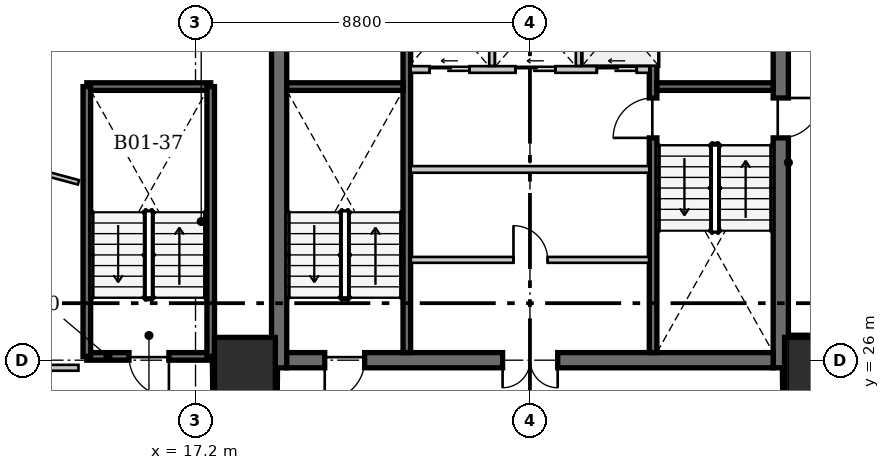
"""IFC4 building model, lengths in metres.
Left out: names, types, materials, properties, quantities, classifications, styles, units other than length and angle.
Written with IfcOpenShell. Run it as: python <this file> out.ifc"""

import sys

from ifc_helpers import new_model, si_unit, direction, frame, frame_2d, origin, origin_2d, place, context, subcontext, project, spatial, rectangle, extrude, source, transform, mapped, element, fill, save


model = new_model("IFC4")
c1 = context("Model", 3, precision=1e-05, world=origin(), true_north=direction((0.0, 1.0)))
c2 = subcontext(c1, "Body", "Model", "MODEL_VIEW")
j1 = project(units=[si_unit("LENGTHUNIT", "METRE"), si_unit("PLANEANGLEUNIT", "RADIAN")], contexts=[c1])
p1 = place(None, origin())
s1 = spatial("IfcSite", under=j1, at=p1, CompositionType="ELEMENT")
p2 = place(p1, origin())
s2 = spatial("IfcBuilding", under=s1, at=p2, CompositionType="ELEMENT")
p3 = place(p2, frame((0.0, 0.0, -5.8)))
s3 = spatial("IfcBuildingStorey", under=s2, at=p3, CompositionType="ELEMENT", Elevation=-5.8)
for number, where, z_axis, x_axis in (
    (1, (18.5, 25.8, 0.0), (0.0, 0.0, 1.0), (1.0, 0.0, 0.0)),
    (2, (33.5, 25.8, 0.0), (0.0, 0.0, 1.0), (1.0, 0.0, 0.0)),
):
    element("IfcColumn", number, at=place(p3, frame(where, z_axis=z_axis, x_axis=x_axis)), inside=s3, PredefinedType="COLUMN", context=c2, shape_type="SweptSolid", body=[
        extrude(rectangle(XDim=1.6, YDim=1.6, at=origin_2d()), origin(), (0.0, 0.0, 1.0), 5.45),
    ])
p4 = place(p3, frame((19.4, 25.8, 0.0), z_axis=(0.0, 0.0, 1.0), x_axis=(0.0, 1.0, 0.0)))
e3 = element("IfcWall", 3, at=p4, inside=s3, PredefinedType="SHEAR", context=c2, shape_type="SweptSolid", body=[
    extrude(rectangle(XDim=10.8, YDim=0.4, at=frame_2d((5.4, 0.0))), origin(), (0.0, 0.0, 1.0), 5.8),
])
p5 = place(p3, frame((32.6, 36.6, 0.0), z_axis=(0.0, 0.0, 1.0), x_axis=(0.0, -1.0, 0.0)))
e4 = element("IfcWall", 4, at=p5, inside=s3, PredefinedType="SHEAR", context=c2, shape_type="SweptSolid", body=[
    extrude(rectangle(XDim=10.8, YDim=0.4, at=frame_2d((5.4, 0.0))), origin(), (0.0, 0.0, 1.0), 5.8),
])
p6 = place(p5, frame((3.7, 0.0, 0.0)))
e5 = element("IfcOpeningElement", 5, at=p6, cuts=e4, PredefinedType="OPENING", context=c2, shape_type="SweptSolid", body=[
    extrude(rectangle(XDim=1.05, YDim=2.15, at=frame_2d((0.525, 1.075))), frame((0.0, 0.21, 0.0), z_axis=(0.0, -1.0, 0.0), x_axis=(1.0, 0.0, 0.0)), (0.0, 0.0, 1.0), 0.42),
])
p7 = place(p3, frame((32.4, 26.0, 0.0), z_axis=(0.0, 0.0, 1.0), x_axis=(-1.0, 0.0, 0.0)))
e6 = element("IfcWall", 6, at=p7, inside=s3, PredefinedType="SHEAR", context=c2, shape_type="SweptSolid", body=[
    extrude(rectangle(XDim=12.8, YDim=0.4, at=frame_2d((6.4, 0.0))), origin(), (0.0, 0.0, 1.0), 5.8),
])
p8 = place(p7, frame((10.75, 0.0, 0.0)))
e7 = element("IfcOpeningElement", 7, at=p8, cuts=e6, PredefinedType="OPENING", context=c2, shape_type="SweptSolid", body=[
    extrude(rectangle(XDim=1.05, YDim=2.15, at=frame_2d((0.525, 1.075))), frame((0.0, 0.21, 0.0), z_axis=(0.0, -1.0, 0.0), x_axis=(1.0, 0.0, 0.0)), (0.0, 0.0, 1.0), 0.42),
])
p9 = place(p7, frame((5.67, 0.0, 0.0)))
e8 = element("IfcOpeningElement", 8, at=p9, cuts=e6, PredefinedType="OPENING", context=c2, shape_type="SweptSolid", body=[
    extrude(rectangle(XDim=1.45, YDim=2.2, at=frame_2d((0.725, 1.1))), frame((0.0, 0.21, 0.0), z_axis=(0.0, -1.0, 0.0), x_axis=(1.0, 0.0, 0.0)), (0.0, 0.0, 1.0), 0.42),
])
p10 = place(p3, frame((22.76, 26.2, 0.0), z_axis=(0.0, 0.0, 1.0), x_axis=(0.0, 1.0, 0.0)))
e9 = element("IfcWall", 9, at=p10, inside=s3, PredefinedType="SHEAR", context=c2, shape_type="SweptSolid", body=[
    extrude(rectangle(XDim=10.0, YDim=0.2, at=frame_2d((5.0, 0.0))), origin(), (0.0, 0.0, 1.0), 5.8),
])
p11 = place(p3, frame((29.24, 26.2, 0.0), z_axis=(0.0, 0.0, 1.0), x_axis=(0.0, 1.0, 0.0)))
e10 = element("IfcWall", 10, at=p11, inside=s3, PredefinedType="SHEAR", context=c2, shape_type="SweptSolid", body=[
    extrude(rectangle(XDim=10.0, YDim=0.2, at=frame_2d((5.0, 0.0))), origin(), (0.0, 0.0, 1.0), 5.8),
])
p12 = place(p11, frame((5.65, 0.0, 0.0)))
e11 = element("IfcOpeningElement", 11, at=p12, cuts=e10, PredefinedType="OPENING", context=c2, shape_type="SweptSolid", body=[
    extrude(rectangle(XDim=1.05, YDim=2.15, at=frame_2d((0.525, 1.075))), frame((0.0, 0.11, 0.0), z_axis=(0.0, -1.0, 0.0), x_axis=(1.0, 0.0, 0.0)), (0.0, 0.0, 1.0), 0.22),
])
for number, where, z_axis, x_axis in (
    (12, (19.6, 33.2, 0.0), (0.0, 0.0, 1.0), (1.0, 0.0, 0.0)),
    (13, (29.34, 33.2, 0.0), (0.0, 0.0, 1.0), (1.0, 0.0, 0.0)),
):
    element("IfcWall", number, at=place(p3, frame(where, z_axis=z_axis, x_axis=x_axis)), inside=s3, PredefinedType="SHEAR", context=c2, shape_type="SweptSolid", body=[
        extrude(rectangle(XDim=3.06, YDim=0.2, at=frame_2d((1.53, 0.0))), origin(), (0.0, 0.0, 1.0), 5.8),
    ])
p13 = place(p3, frame((22.86, 33.65, 0.0), z_axis=(0.0, 0.0, 1.0), x_axis=(1.0, 0.0, 0.0)))
e14 = element("IfcWall", 14, at=p13, inside=s3, PredefinedType="SOLIDWALL", context=c2, shape_type="SweptSolid", body=[
    extrude(rectangle(XDim=6.28, YDim=0.175, at=frame_2d((3.14, 0.0))), origin(), (0.0, 0.0, 1.0), 5.45),
])
p14 = place(p13, frame((0.5, 0.0, 0.0)))
e15 = element("IfcOpeningElement", 15, at=p14, cuts=e14, PredefinedType="OPENING", context=c2, shape_type="SweptSolid", body=[
    extrude(rectangle(XDim=1.05, YDim=2.15, at=frame_2d((0.525, 1.075))), frame((0.0, 0.098, 0.0), z_axis=(0.0, -1.0, 0.0), x_axis=(1.0, 0.0, 0.0)), (0.0, 0.0, 1.0), 0.195),
])
p15 = place(p13, frame((2.76, 0.0, 0.0)))
e16 = element("IfcOpeningElement", 16, at=p15, cuts=e14, PredefinedType="OPENING", context=c2, shape_type="SweptSolid", body=[
    extrude(rectangle(XDim=1.05, YDim=2.15, at=frame_2d((0.525, 1.075))), frame((0.0, 0.098, 0.0), z_axis=(0.0, -1.0, 0.0), x_axis=(1.0, 0.0, 0.0)), (0.0, 0.0, 1.0), 0.195),
])
p16 = place(p13, frame((4.9, 0.0, 0.0)))
e17 = element("IfcOpeningElement", 17, at=p16, cuts=e14, PredefinedType="OPENING", context=c2, shape_type="SweptSolid", body=[
    extrude(rectangle(XDim=1.05, YDim=2.15, at=frame_2d((0.525, 1.075))), frame((0.0, 0.098, 0.0), z_axis=(0.0, -1.0, 0.0), x_axis=(1.0, 0.0, 0.0)), (0.0, 0.0, 1.0), 0.195),
])
for number, where, z_axis, x_axis in (
    (18, (25.0, 33.743, 0.0), (0.0, 0.0, 1.0), (0.0, 1.0, 0.0)),
    (19, (27.28, 33.743, 0.0), (0.0, 0.0, 1.0), (0.0, 1.0, 0.0)),
):
    element("IfcWall", number, at=place(p3, frame(where, z_axis=z_axis, x_axis=x_axis)), inside=s3, PredefinedType="SOLIDWALL", context=c2, shape_type="SweptSolid", body=[
        extrude(rectangle(XDim=2.457, YDim=0.145, at=frame_2d((1.228, 0.0))), origin(), (0.0, 0.0, 1.0), 5.45),
    ])
p17 = place(p3, frame((22.86, 31.02, 0.0), z_axis=(0.0, 0.0, 1.0), x_axis=(1.0, 0.0, 0.0)))
e20 = element("IfcWall", 20, at=p17, inside=s3, PredefinedType="SOLIDWALL", context=c2, shape_type="SweptSolid", body=[
    extrude(rectangle(XDim=6.28, YDim=0.175, at=frame_2d((3.14, 0.0))), origin(), (0.0, 0.0, 1.0), 5.45),
])
p18 = place(p3, frame((22.866, 28.64, 0.0), z_axis=(0.0, 0.0, 1.0), x_axis=(1.0, 0.0, 0.0)))
e21 = element("IfcWall", 21, at=p18, inside=s3, PredefinedType="PARTITIONING", context=c2, shape_type="SweptSolid", body=[
    extrude(rectangle(XDim=6.268, YDim=0.155, at=frame_2d((3.134, 0.0))), origin(), (0.0, 0.0, 1.0), 5.45),
])
p19 = place(p18, frame((2.7, 0.0, 0.0)))
e22 = element("IfcOpeningElement", 22, at=p19, cuts=e21, PredefinedType="OPENING", context=c2, shape_type="SweptSolid", body=[
    extrude(rectangle(XDim=0.9, YDim=2.1, at=frame_2d((0.45, 1.05))), frame((0.0, 0.087, 0.0), z_axis=(0.0, -1.0, 0.0), x_axis=(1.0, 0.0, 0.0)), (0.0, 0.0, 1.0), 0.175),
])
p20 = place(p3, frame((17.6, 26.1, 0.0), z_axis=(0.0, 0.0, 1.0), x_axis=(-1.0, 0.0, 0.0)))
e23 = element("IfcWall", 23, at=p20, inside=s3, PredefinedType="SHEAR", context=c2, shape_type="SweptSolid", body=[
    extrude(rectangle(XDim=3.26, YDim=0.2, at=frame_2d((1.63, 0.0))), origin(), (0.0, 0.0, 1.0), 5.8),
])
p21 = place(p20, frame((1.1, 0.0, 0.0)))
e24 = element("IfcOpeningElement", 24, at=p21, cuts=e23, PredefinedType="OPENING", context=c2, shape_type="SweptSolid", body=[
    extrude(rectangle(XDim=1.05, YDim=2.15, at=frame_2d((0.525, 1.075))), frame((0.0, 0.11, 0.0), z_axis=(0.0, -1.0, 0.0), x_axis=(1.0, 0.0, 0.0)), (0.0, 0.0, 1.0), 0.22),
])
p22 = place(p3, frame((14.34, 33.2, 0.0), z_axis=(0.0, 0.0, 1.0), x_axis=(1.0, 0.0, 0.0)))
e25 = element("IfcWall", 25, at=p22, inside=s3, PredefinedType="SHEAR", context=c2, shape_type="SweptSolid", body=[
    extrude(rectangle(XDim=3.26, YDim=0.2, at=frame_2d((1.63, 0.0))), origin(), (0.0, 0.0, 1.0), 5.8),
])
for number, where, z_axis, x_axis in (
    (26, (14.34, 26.1, 0.0), (0.0, 0.0, 1.0), (0.0, 1.0, 0.0)),
    (27, (17.6, 26.1, 0.0), (0.0, 0.0, 1.0), (0.0, 1.0, 0.0)),
):
    element("IfcWall", number, at=place(p3, frame(where, z_axis=z_axis, x_axis=x_axis)), inside=s3, PredefinedType="SHEAR", context=c2, shape_type="SweptSolid", body=[
        extrude(rectangle(XDim=7.1, YDim=0.2, at=frame_2d((3.55, 0.0))), origin(), (0.0, 0.0, 1.0), 5.8),
    ])
p23 = place(p3, frame((11.698, 25.8, 0.0), z_axis=(0.0, 0.0, 1.0), x_axis=(1.0, 0.0, 0.0)))
e28 = element("IfcWall", 28, at=p23, inside=s3, PredefinedType="PARTITIONING", context=c2, shape_type="SweptSolid", body=[
    extrude(rectangle(XDim=2.422, YDim=0.155, at=frame_2d((1.211, 0.0))), origin(), (0.0, 0.0, 1.0), 5.45),
])
p24 = place(p3, frame((17.685, 25.95, 0.0), z_axis=(0.0, 0.0, 1.0), x_axis=(0.01543338431, -0.999880898232, 0.0)))
e29 = element("IfcWall", 29, at=p24, inside=s3, PredefinedType="PARTITIONING", context=c2, shape_type="SweptSolid", body=[
    extrude(rectangle(XDim=0.965, YDim=0.155, at=frame_2d((0.482, 0.0))), origin(), (0.0, 0.0, 1.0), 5.45),
])
p25 = place(p3, frame((19.308, 25.07, 0.0), z_axis=(0.0, 0.0, 1.0), x_axis=(0.010362137944, 0.999946311607, 0.0)))
e30 = element("IfcWall", 30, at=p25, inside=s3, PredefinedType="PARTITIONING", context=c2, shape_type="SweptSolid", body=[
    extrude(rectangle(XDim=0.66, YDim=0.155, at=frame_2d((0.33, 0.0))), origin(), (0.0, 0.0, 1.0), 5.45),
])
p26 = place(p3, frame((32.685, 25.73, 0.0), z_axis=(0.0, 0.0, 1.0), x_axis=(0.010511902743, -0.999944748424, 0.0)))
e31 = element("IfcWall", 31, at=p26, inside=s3, PredefinedType="PARTITIONING", context=c2, shape_type="SweptSolid", body=[
    extrude(rectangle(XDim=0.743, YDim=0.155, at=frame_2d((0.372, 0.0))), origin(), (0.0, 0.0, 1.0), 5.45),
])
p27 = place(p3, frame((34.227, 26.611, 0.0), z_axis=(0.0, 0.0, 1.0), x_axis=(-0.999995856473, 0.002878721429, 0.0)))
e32 = element("IfcWall", 32, at=p27, inside=s3, PredefinedType="PARTITIONING", context=c2, shape_type="SweptSolid", body=[
    extrude(rectangle(XDim=1.357, YDim=0.155, at=frame_2d((0.678, 0.0))), origin(), (0.0, 0.0, 1.0), 5.45),
])
p28 = place(p3, frame((0.45, 34.35, 0.0), z_axis=(0.0, 0.0, 1.0), x_axis=(0.965797547466, -0.259297314505, 0.0)))
e33 = element("IfcWall", 33, at=p28, inside=s3, PredefinedType="PARTITIONING", context=c2, shape_type="SweptSolid", body=[
    extrude(rectangle(XDim=14.154, YDim=0.12, at=frame_2d((7.077, 0.0))), origin(), (0.0, 0.0, 1.0), 5.012),
])
m1 = source(origin(), c2, "Body", "SweptSolid", [
    extrude(rectangle(XDim=1.05, YDim=2.15, at=frame_2d((0.525, 1.075))), frame((0.0, 0.025, 0.0), z_axis=(0.0, -1.0, 0.0), x_axis=(1.0, 0.0, 0.0)), (0.0, 0.0, 1.0), 0.05),
])
p29 = place(p8, origin())
e34 = element("IfcDoor", 34, at=p29, inside=s3, OperationType="SINGLE_SWING_RIGHT", PredefinedType="DOOR", context=c2, shape_type="MappedRepresentation", body=[
    mapped(m1, transform((0.0, 0.0, 0.0), x_axis=(1.0, 0.0, 0.0), y_axis=(0.0, 1.0, 0.0), z_axis=(0.0, 0.0, 1.0), scale=1.0)),
])
fill(e7, e34)
m2 = source(origin(), c2, "Body", "SweptSolid", [
    extrude(rectangle(XDim=1.45, YDim=2.2, at=frame_2d((0.725, 1.1))), frame((0.0, 0.025, 0.0), z_axis=(0.0, -1.0, 0.0), x_axis=(1.0, 0.0, 0.0)), (0.0, 0.0, 1.0), 0.05),
])
p30 = place(p9, origin())
e35 = element("IfcDoor", 35, at=p30, inside=s3, OperationType="DOUBLE_DOOR_SINGLE_SWING", PredefinedType="DOOR", context=c2, shape_type="MappedRepresentation", body=[
    mapped(m2, transform((0.0, 0.0, 0.0), x_axis=(1.0, 0.0, 0.0), y_axis=(0.0, 1.0, 0.0), z_axis=(0.0, 0.0, 1.0), scale=1.0)),
])
fill(e8, e35)
p31 = place(p6, origin())
e36 = element("IfcDoor", 36, at=p31, inside=s3, OperationType="SINGLE_SWING_LEFT", PredefinedType="DOOR", context=c2, shape_type="MappedRepresentation", body=[
    mapped(m1, transform((0.0, 0.0, 0.0), x_axis=(1.0, 0.0, 0.0), y_axis=(0.0, 1.0, 0.0), z_axis=(0.0, 0.0, 1.0), scale=1.0)),
])
fill(e5, e36)
p32 = place(p12, origin())
e37 = element("IfcDoor", 37, at=p32, inside=s3, OperationType="SINGLE_SWING_LEFT", PredefinedType="DOOR", context=c2, shape_type="MappedRepresentation", body=[
    mapped(m1, transform((0.0, 0.0, 0.0), x_axis=(1.0, 0.0, 0.0), y_axis=(0.0, 1.0, 0.0), z_axis=(0.0, 0.0, 1.0), scale=1.0)),
])
fill(e11, e37)
m3 = source(origin(), c2, "Body", "SweptSolid", [
    extrude(rectangle(XDim=1.05, YDim=2.15, at=frame_2d((0.525, 1.075))), frame((0.0, 0.025, 0.0), z_axis=(0.0, -1.0, 0.0), x_axis=(1.0, 0.0, 0.0)), (0.0, 0.0, 1.0), 0.05),
])
p33 = place(p14, origin())
e38 = element("IfcDoor", 38, at=p33, inside=s3, OperationType="SLIDING_TO_LEFT", PredefinedType="DOOR", context=c2, shape_type="MappedRepresentation", body=[
    mapped(m3, transform((0.0, 0.0, 0.0), x_axis=(1.0, 0.0, 0.0), y_axis=(0.0, 1.0, 0.0), z_axis=(0.0, 0.0, 1.0), scale=1.0)),
])
fill(e15, e38)
p34 = place(p15, origin())
e39 = element("IfcDoor", 39, at=p34, inside=s3, OperationType="SLIDING_TO_LEFT", PredefinedType="DOOR", context=c2, shape_type="MappedRepresentation", body=[
    mapped(m3, transform((0.0, 0.0, 0.0), x_axis=(1.0, 0.0, 0.0), y_axis=(0.0, 1.0, 0.0), z_axis=(0.0, 0.0, 1.0), scale=1.0)),
])
fill(e16, e39)
p35 = place(p16, origin())
e40 = element("IfcDoor", 40, at=p35, inside=s3, OperationType="SLIDING_TO_LEFT", PredefinedType="DOOR", context=c2, shape_type="MappedRepresentation", body=[
    mapped(m3, transform((0.0, 0.0, 0.0), x_axis=(1.0, 0.0, 0.0), y_axis=(0.0, 1.0, 0.0), z_axis=(0.0, 0.0, 1.0), scale=1.0)),
])
fill(e17, e40)
m4 = source(origin(), c2, "Body", "SweptSolid", [
    extrude(rectangle(XDim=0.9, YDim=2.1, at=frame_2d((0.45, 1.05))), frame((0.0, 0.025, 0.0), z_axis=(0.0, -1.0, 0.0), x_axis=(1.0, 0.0, 0.0)), (0.0, 0.0, 1.0), 0.05),
])
p36 = place(p19, origin())
e41 = element("IfcDoor", 41, at=p36, inside=s3, OperationType="SINGLE_SWING_LEFT", PredefinedType="DOOR", context=c2, shape_type="MappedRepresentation", body=[
    mapped(m4, transform((0.0, 0.0, 0.0), x_axis=(1.0, 0.0, 0.0), y_axis=(0.0, 1.0, 0.0), z_axis=(0.0, 0.0, 1.0), scale=1.0)),
])
fill(e22, e41)
p37 = place(p21, origin())
e42 = element("IfcDoor", 42, at=p37, inside=s3, OperationType="SINGLE_SWING_LEFT", PredefinedType="DOOR", context=c2, shape_type="MappedRepresentation", body=[
    mapped(m1, transform((0.0, 0.0, 0.0), x_axis=(1.0, 0.0, 0.0), y_axis=(0.0, 1.0, 0.0), z_axis=(0.0, 0.0, 1.0), scale=1.0)),
])
fill(e24, e42)
save(model, sys.argv[1])
